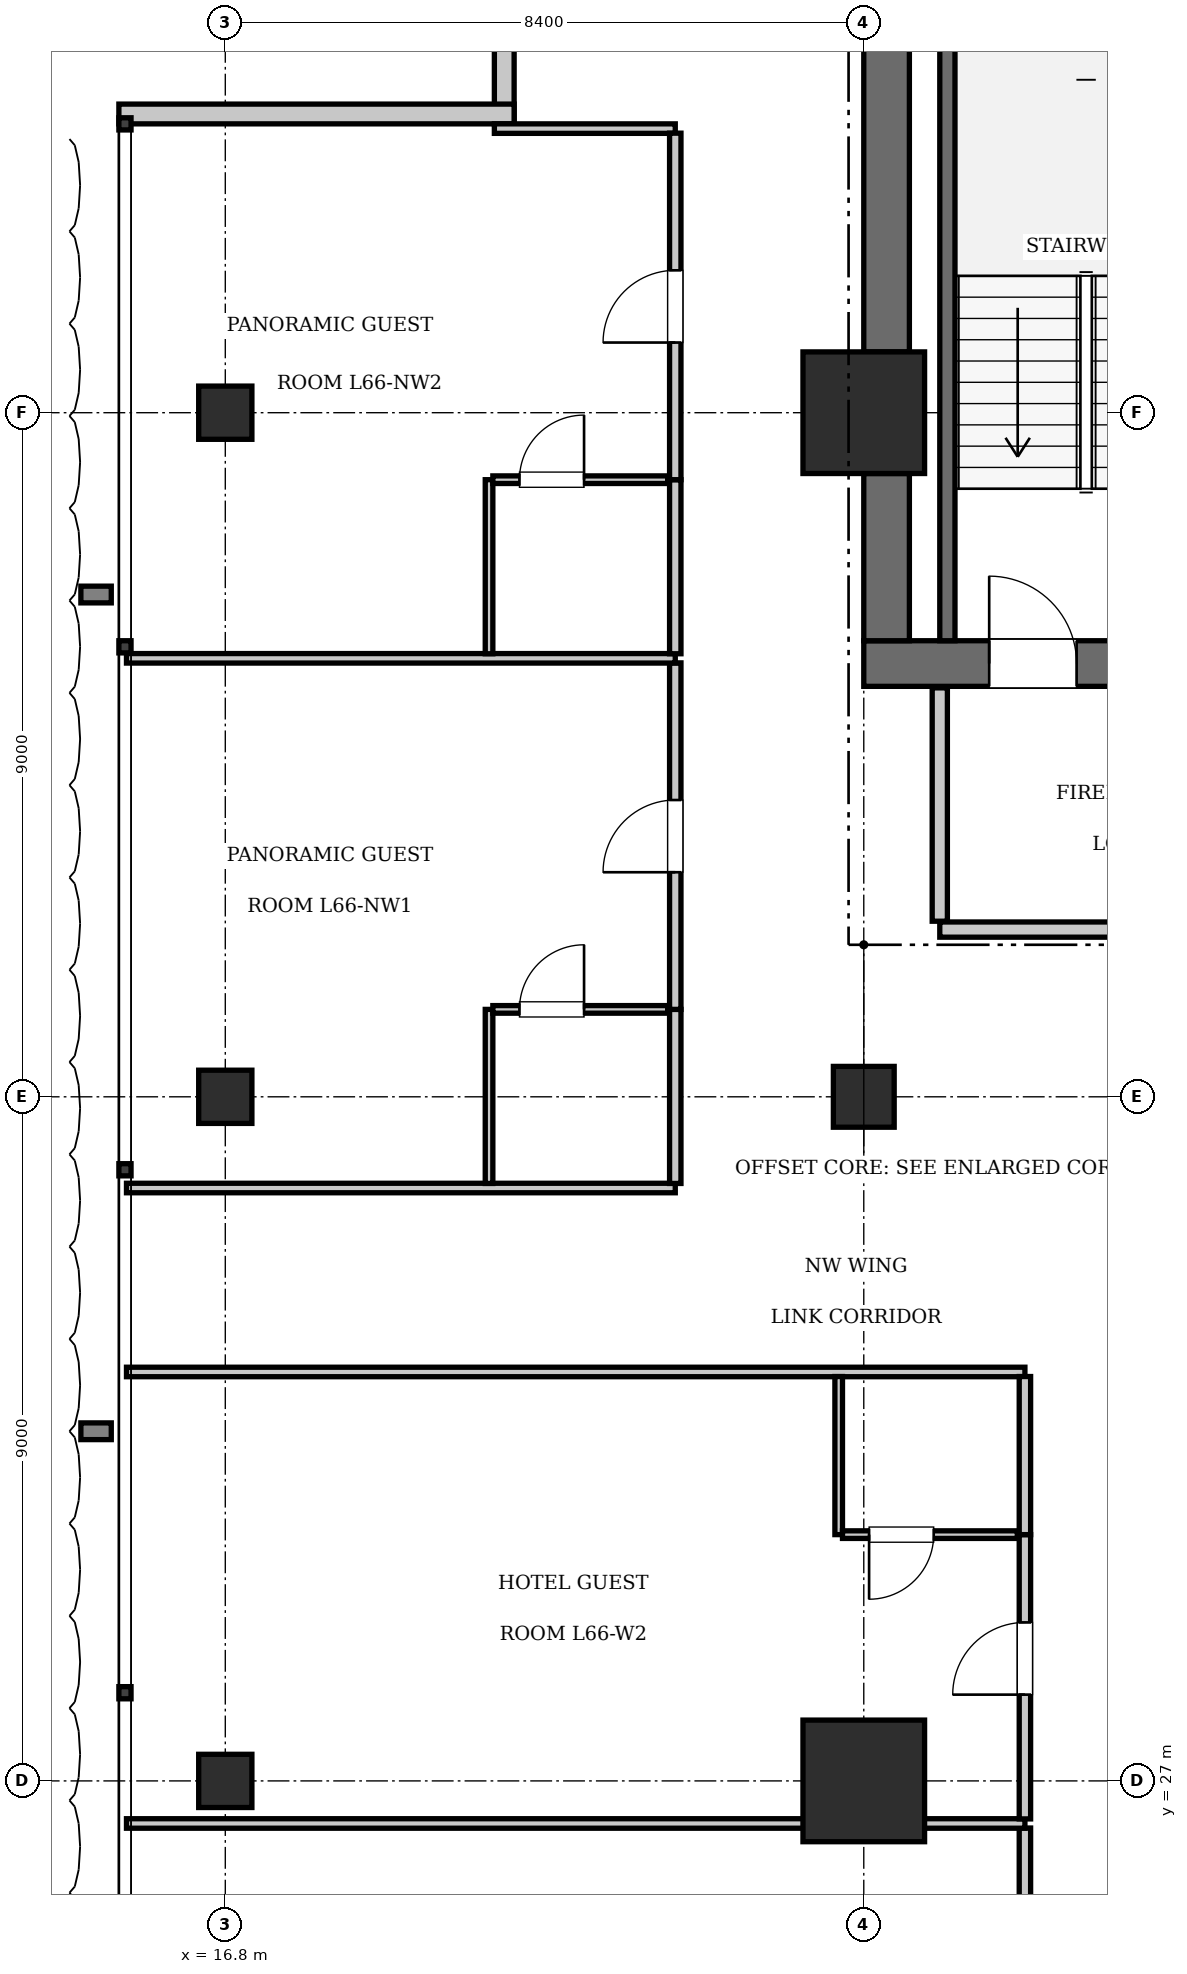
"""IFC4 building model, lengths in metres.
Left out: names, types, materials, properties, quantities, classifications, styles, units other than length and angle.
Written with IfcOpenShell. Run it as: python <this file> out.ifc"""

import sys

from ifc_helpers import new_model, si_unit, direction, frame, frame_2d, origin, origin_2d, place, context, subcontext, project, spatial, rectangle, extrude, element, fill, save


model = new_model("IFC4")
c1 = context("Model", 3, precision=1e-05, world=origin(), true_north=direction((0.0, 1.0)))
c2 = subcontext(c1, "Body", "Model", "MODEL_VIEW")
j1 = project(units=[si_unit("LENGTHUNIT", "METRE"), si_unit("PLANEANGLEUNIT", "RADIAN")], contexts=[c1])
p1 = place(None, origin())
s1 = spatial("IfcSite", under=j1, at=p1, CompositionType="ELEMENT")
p2 = place(p1, origin())
s2 = spatial("IfcBuilding", under=s1, at=p2, CompositionType="ELEMENT")
p3 = place(p2, frame((0.0, 0.0, 270.2)))
s3 = spatial("IfcBuildingStorey", under=s2, at=p3, CompositionType="ELEMENT", Elevation=270.2)
for number, where, z_axis, x_axis in (
    (1, (25.2, 27.0, 0.0), (0.0, 0.0, 1.0), (1.0, 0.0, 0.0)),
    (2, (25.2, 45.0, 0.0), (0.0, 0.0, 1.0), (1.0, 0.0, 0.0)),
):
    element("IfcColumn", number, at=place(p3, frame(where, z_axis=z_axis, x_axis=x_axis)), inside=s3, PredefinedType="COLUMN", context=c2, shape_type="SweptSolid", body=[
        extrude(rectangle(XDim=1.6, YDim=1.6, at=origin_2d()), origin(), (0.0, 0.0, 1.0), 3.85),
    ])
p4 = place(p3, frame((25.2, 41.7, 0.0), z_axis=(0.0, 0.0, 1.0), x_axis=(1.0, 0.0, 0.0)))
e3 = element("IfcWall", 3, at=p4, inside=s3, PredefinedType="SHEAR", context=c2, shape_type="SweptSolid", body=[
    extrude(rectangle(XDim=6.8, YDim=0.6, at=frame_2d((3.4, 0.0))), origin(), (0.0, 0.0, 1.0), 3.85),
])
p5 = place(p4, frame((1.65, 0.0, 0.0)))
e4 = element("IfcOpeningElement", 4, at=p5, cuts=e3, PredefinedType="OPENING", context=c2, shape_type="SweptSolid", body=[
    extrude(rectangle(XDim=1.15, YDim=2.15, at=frame_2d((0.575, 1.075))), frame((0.0, 0.31, 0.0), z_axis=(0.0, -1.0, 0.0), x_axis=(1.0, 0.0, 0.0)), (0.0, 0.0, 1.0), 0.62),
])
p6 = place(p4, frame((5.15, 0.0, 0.0)))
e5 = element("IfcOpeningElement", 5, at=p6, cuts=e3, PredefinedType="OPENING", context=c2, shape_type="SweptSolid", body=[
    extrude(rectangle(XDim=1.1, YDim=2.2, at=frame_2d((0.55, 1.1))), frame((0.0, 0.31, 0.0), z_axis=(0.0, -1.0, 0.0), x_axis=(1.0, 0.0, 0.0)), (0.0, 0.0, 1.0), 0.62),
])
p7 = place(p3, frame((25.5, 42.0, 0.0), z_axis=(0.0, 0.0, 1.0), x_axis=(0.0, 1.0, 0.0)))
e6 = element("IfcWall", 6, at=p7, inside=s3, PredefinedType="SHEAR", context=c2, shape_type="SweptSolid", body=[
    extrude(rectangle(XDim=2.2, YDim=0.6, at=frame_2d((1.1, 0.0))), origin(), (0.0, 0.0, 1.0), 3.85),
])
p8 = place(p3, frame((25.5, 45.8, 0.0), z_axis=(0.0, 0.0, 1.0), x_axis=(0.0, 1.0, 0.0)))
e7 = element("IfcWall", 7, at=p8, inside=s3, PredefinedType="SHEAR", context=c2, shape_type="SweptSolid", body=[
    extrude(rectangle(XDim=7.6, YDim=0.6, at=frame_2d((3.8, 0.0))), origin(), (0.0, 0.0, 1.0), 3.85),
])
p9 = place(p3, frame((25.2, 36.0, 0.0), z_axis=(0.0, 0.0, 1.0), x_axis=(1.0, 0.0, 0.0)))
e8 = element("IfcColumn", 8, at=p9, inside=s3, PredefinedType="COLUMN", context=c2, shape_type="SweptSolid", body=[
    extrude(rectangle(XDim=0.8, YDim=0.8, at=origin_2d()), origin(), (0.0, 0.0, 1.0), 3.85),
])
for number, where, z_axis, x_axis in (
    (9, (16.8, 27.0, 0.0), (0.0, 0.0, 1.0), (1.0, 0.0, 0.0)),
    (10, (16.8, 36.0, 0.0), (0.0, 0.0, 1.0), (1.0, 0.0, 0.0)),
    (11, (16.8, 45.0, 0.0), (0.0, 0.0, 1.0), (1.0, 0.0, 0.0)),
):
    element("IfcColumn", number, at=place(p3, frame(where, z_axis=z_axis, x_axis=x_axis)), inside=s3, PredefinedType="COLUMN", context=c2, shape_type="SweptSolid", body=[
        extrude(rectangle(XDim=0.7, YDim=0.7, at=origin_2d()), origin(), (0.0, 0.0, 1.0), 3.85),
    ])
p10 = place(p3, frame((26.3, 42.0, 0.0), z_axis=(0.0, 0.0, 1.0), x_axis=(0.0, 1.0, 0.0)))
e12 = element("IfcWall", 12, at=p10, inside=s3, PredefinedType="SOLIDWALL", context=c2, shape_type="SweptSolid", body=[
    extrude(rectangle(XDim=9.12, YDim=0.2, at=frame_2d((4.56, 0.0))), origin(), (0.0, 0.0, 1.0), 3.61),
])
p11 = place(p3, frame((20.47, 48.8, 0.0), z_axis=(0.0, 0.0, 1.0), x_axis=(0.0, 1.0, 0.0)))
e13 = element("IfcWall", 13, at=p11, inside=s3, PredefinedType="SOLIDWALL", context=c2, shape_type="SweptSolid", body=[
    extrude(rectangle(XDim=5.2, YDim=0.26, at=frame_2d((2.6, 0.0))), origin(), (0.0, 0.0, 1.0), 3.61),
])
p12 = place(p3, frame((15.4, 48.93, 0.0), z_axis=(0.0, 0.0, 1.0), x_axis=(1.0, 0.0, 0.0)))
e14 = element("IfcWall", 14, at=p12, inside=s3, PredefinedType="SOLIDWALL", context=c2, shape_type="SweptSolid", body=[
    extrude(rectangle(XDim=5.2, YDim=0.26, at=frame_2d((2.6, 0.0))), origin(), (0.0, 0.0, 1.0), 3.61),
])
p13 = place(p3, frame((26.2, 38.2, 0.0), z_axis=(0.0, 0.0, 1.0), x_axis=(1.0, 0.0, 0.0)))
e15 = element("IfcWall", 15, at=p13, inside=s3, PredefinedType="PARTITIONING", context=c2, shape_type="SweptSolid", body=[
    extrude(rectangle(XDim=5.8, YDim=0.2, at=frame_2d((2.9, 0.0))), origin(), (0.0, 0.0, 1.0), 3.61),
])
p14 = place(p13, frame((2.3, 0.0, 0.0)))
e16 = element("IfcOpeningElement", 16, at=p14, cuts=e15, PredefinedType="OPENING", context=c2, shape_type="SweptSolid", body=[
    extrude(rectangle(XDim=1.15, YDim=2.15, at=frame_2d((0.575, 1.075))), frame((0.0, 0.11, 0.0), z_axis=(0.0, -1.0, 0.0), x_axis=(1.0, 0.0, 0.0)), (0.0, 0.0, 1.0), 0.22),
])
p15 = place(p3, frame((26.2, 38.31, 0.0), z_axis=(0.0, 0.0, 1.0), x_axis=(0.0, 1.0, 0.0)))
e17 = element("IfcWall", 17, at=p15, inside=s3, PredefinedType="PARTITIONING", context=c2, shape_type="SweptSolid", body=[
    extrude(rectangle(XDim=3.07, YDim=0.2, at=frame_2d((1.535, 0.0))), origin(), (0.0, 0.0, 1.0), 3.61),
])
p16 = place(p3, frame((15.5, 32.38, 0.0), z_axis=(0.0, 0.0, 1.0), x_axis=(1.0, 0.0, 0.0)))
e18 = element("IfcWall", 18, at=p16, inside=s3, PredefinedType="PARTITIONING", context=c2, shape_type="SweptSolid", body=[
    extrude(rectangle(XDim=11.82, YDim=0.125, at=frame_2d((5.91, 0.0))), origin(), (0.0, 0.0, 1.0), 3.61),
])
p17 = place(p3, frame((27.32, 22.64, 0.0), z_axis=(0.0, 0.0, 1.0), x_axis=(0.0, 1.0, 0.0)))
e19 = element("IfcWall", 19, at=p17, inside=s3, PredefinedType="PARTITIONING", context=c2, shape_type="SweptSolid", body=[
    extrude(rectangle(XDim=3.74, YDim=0.15, at=frame_2d((1.87, 0.0))), origin(), (0.0, 0.0, 1.0), 3.61),
])
p18 = place(p17, frame((1.395, 0.0, 0.0)))
e20 = element("IfcOpeningElement", 20, at=p18, cuts=e19, PredefinedType="OPENING", context=c2, shape_type="SweptSolid", body=[
    extrude(rectangle(XDim=0.95, YDim=2.15, at=frame_2d((0.475, 1.075))), frame((0.0, 0.085, 0.0), z_axis=(0.0, -1.0, 0.0), x_axis=(1.0, 0.0, 0.0)), (0.0, 0.0, 1.0), 0.17),
])
p19 = place(p3, frame((15.5, 26.44, 0.0), z_axis=(0.0, 0.0, 1.0), x_axis=(1.0, 0.0, 0.0)))
e21 = element("IfcWall", 21, at=p19, inside=s3, PredefinedType="PARTITIONING", context=c2, shape_type="SweptSolid", body=[
    extrude(rectangle(XDim=11.82, YDim=0.125, at=frame_2d((5.91, 0.0))), origin(), (0.0, 0.0, 1.0), 3.61),
])
p20 = place(p3, frame((27.32, 26.5, 0.0), z_axis=(0.0, 0.0, 1.0), x_axis=(0.0, 1.0, 0.0)))
e22 = element("IfcWall", 22, at=p20, inside=s3, PredefinedType="PARTITIONING", context=c2, shape_type="SweptSolid", body=[
    extrude(rectangle(XDim=3.74, YDim=0.15, at=frame_2d((1.87, 0.0))), origin(), (0.0, 0.0, 1.0), 3.61),
])
p21 = place(p20, frame((1.635, 0.0, 0.0)))
e23 = element("IfcOpeningElement", 23, at=p21, cuts=e22, PredefinedType="OPENING", context=c2, shape_type="SweptSolid", body=[
    extrude(rectangle(XDim=0.95, YDim=2.15, at=frame_2d((0.475, 1.075))), frame((0.0, 0.085, 0.0), z_axis=(0.0, -1.0, 0.0), x_axis=(1.0, 0.0, 0.0)), (0.0, 0.0, 1.0), 0.17),
])
p22 = place(p3, frame((27.32, 30.24, 0.0), z_axis=(0.0, 0.0, 1.0), x_axis=(0.0, 1.0, 0.0)))
e24 = element("IfcWall", 24, at=p22, inside=s3, PredefinedType="PARTITIONING", context=c2, shape_type="SweptSolid", body=[
    extrude(rectangle(XDim=2.08, YDim=0.15, at=frame_2d((1.04, 0.0))), origin(), (0.0, 0.0, 1.0), 3.61),
])
p23 = place(p3, frame((24.87, 30.24, 0.0), z_axis=(0.0, 0.0, 1.0), x_axis=(0.0, 1.0, 0.0)))
e25 = element("IfcWall", 25, at=p23, inside=s3, PredefinedType="PARTITIONING", context=c2, shape_type="SweptSolid", body=[
    extrude(rectangle(XDim=2.08, YDim=0.1, at=frame_2d((1.04, 0.0))), origin(), (0.0, 0.0, 1.0), 3.61),
])
p24 = place(p3, frame((24.92, 30.24, 0.0), z_axis=(0.0, 0.0, 1.0), x_axis=(1.0, 0.0, 0.0)))
e26 = element("IfcWall", 26, at=p24, inside=s3, PredefinedType="PARTITIONING", context=c2, shape_type="SweptSolid", body=[
    extrude(rectangle(XDim=2.3, YDim=0.1, at=frame_2d((1.15, 0.0))), origin(), (0.0, 0.0, 1.0), 3.61),
])
p25 = place(p24, frame((0.35, 0.0, 0.0)))
e27 = element("IfcOpeningElement", 27, at=p25, cuts=e26, PredefinedType="OPENING", context=c2, shape_type="SweptSolid", body=[
    extrude(rectangle(XDim=0.85, YDim=2.1, at=frame_2d((0.425, 1.05))), frame((0.0, 0.06, 0.0), z_axis=(0.0, -1.0, 0.0), x_axis=(1.0, 0.0, 0.0)), (0.0, 0.0, 1.0), 0.12),
])
p26 = place(p3, frame((15.5, 34.8, 0.0), z_axis=(0.0, 0.0, 1.0), x_axis=(1.0, 0.0, 0.0)))
e28 = element("IfcWall", 28, at=p26, inside=s3, PredefinedType="PARTITIONING", context=c2, shape_type="SweptSolid", body=[
    extrude(rectangle(XDim=7.22, YDim=0.125, at=frame_2d((3.61, 0.0))), origin(), (0.0, 0.0, 1.0), 3.61),
])
p27 = place(p3, frame((20.34, 48.738, 0.0), z_axis=(0.0, 0.0, 1.0), x_axis=(1.0, 0.0, 0.0)))
e29 = element("IfcWall", 29, at=p27, inside=s3, PredefinedType="PARTITIONING", context=c2, shape_type="SweptSolid", body=[
    extrude(rectangle(XDim=2.38, YDim=0.125, at=frame_2d((1.19, 0.0))), origin(), (0.0, 0.0, 1.0), 3.61),
])
p28 = place(p3, frame((22.72, 34.86, 0.0), z_axis=(0.0, 0.0, 1.0), x_axis=(0.0, 1.0, 0.0)))
e30 = element("IfcWall", 30, at=p28, inside=s3, PredefinedType="PARTITIONING", context=c2, shape_type="SweptSolid", body=[
    extrude(rectangle(XDim=2.29, YDim=0.15, at=frame_2d((1.145, 0.0))), origin(), (0.0, 0.0, 1.0), 3.61),
])
p29 = place(p3, frame((22.72, 37.15, 0.0), z_axis=(0.0, 0.0, 1.0), x_axis=(0.0, 1.0, 0.0)))
e31 = element("IfcWall", 31, at=p29, inside=s3, PredefinedType="PARTITIONING", context=c2, shape_type="SweptSolid", body=[
    extrude(rectangle(XDim=4.559, YDim=0.15, at=frame_2d((2.279, 0.0))), origin(), (0.0, 0.0, 1.0), 3.61),
])
p30 = place(p29, frame((1.804, 0.0, 0.0)))
e32 = element("IfcOpeningElement", 32, at=p30, cuts=e31, PredefinedType="OPENING", context=c2, shape_type="SweptSolid", body=[
    extrude(rectangle(XDim=0.95, YDim=2.15, at=frame_2d((0.475, 1.075))), frame((0.0, 0.085, 0.0), z_axis=(0.0, -1.0, 0.0), x_axis=(1.0, 0.0, 0.0)), (0.0, 0.0, 1.0), 0.17),
])
p31 = place(p3, frame((20.27, 34.86, 0.0), z_axis=(0.0, 0.0, 1.0), x_axis=(0.0, 1.0, 0.0)))
e33 = element("IfcWall", 33, at=p31, inside=s3, PredefinedType="PARTITIONING", context=c2, shape_type="SweptSolid", body=[
    extrude(rectangle(XDim=2.29, YDim=0.1, at=frame_2d((1.145, 0.0))), origin(), (0.0, 0.0, 1.0), 3.61),
])
p32 = place(p3, frame((20.32, 37.15, 0.0), z_axis=(0.0, 0.0, 1.0), x_axis=(1.0, 0.0, 0.0)))
e34 = element("IfcWall", 34, at=p32, inside=s3, PredefinedType="PARTITIONING", context=c2, shape_type="SweptSolid", body=[
    extrude(rectangle(XDim=2.3, YDim=0.1, at=frame_2d((1.15, 0.0))), origin(), (0.0, 0.0, 1.0), 3.61),
])
p33 = place(p32, frame((0.35, 0.0, 0.0)))
e35 = element("IfcOpeningElement", 35, at=p33, cuts=e34, PredefinedType="OPENING", context=c2, shape_type="SweptSolid", body=[
    extrude(rectangle(XDim=0.85, YDim=2.1, at=frame_2d((0.425, 1.05))), frame((0.0, 0.06, 0.0), z_axis=(0.0, -1.0, 0.0), x_axis=(1.0, 0.0, 0.0)), (0.0, 0.0, 1.0), 0.12),
])
p34 = place(p3, frame((15.5, 41.769, 0.0), z_axis=(0.0, 0.0, 1.0), x_axis=(1.0, 0.0, 0.0)))
e36 = element("IfcWall", 36, at=p34, inside=s3, PredefinedType="PARTITIONING", context=c2, shape_type="SweptSolid", body=[
    extrude(rectangle(XDim=7.22, YDim=0.125, at=frame_2d((3.61, 0.0))), origin(), (0.0, 0.0, 1.0), 3.61),
])
p35 = place(p3, frame((22.72, 41.829, 0.0), z_axis=(0.0, 0.0, 1.0), x_axis=(0.0, 1.0, 0.0)))
e37 = element("IfcWall", 37, at=p35, inside=s3, PredefinedType="PARTITIONING", context=c2, shape_type="SweptSolid", body=[
    extrude(rectangle(XDim=2.29, YDim=0.15, at=frame_2d((1.145, 0.0))), origin(), (0.0, 0.0, 1.0), 3.61),
])
p36 = place(p3, frame((22.72, 44.119, 0.0), z_axis=(0.0, 0.0, 1.0), x_axis=(0.0, 1.0, 0.0)))
e38 = element("IfcWall", 38, at=p36, inside=s3, PredefinedType="PARTITIONING", context=c2, shape_type="SweptSolid", body=[
    extrude(rectangle(XDim=4.559, YDim=0.15, at=frame_2d((2.279, 0.0))), origin(), (0.0, 0.0, 1.0), 3.61),
])
p37 = place(p36, frame((1.804, 0.0, 0.0)))
e39 = element("IfcOpeningElement", 39, at=p37, cuts=e38, PredefinedType="OPENING", context=c2, shape_type="SweptSolid", body=[
    extrude(rectangle(XDim=0.95, YDim=2.15, at=frame_2d((0.475, 1.075))), frame((0.0, 0.085, 0.0), z_axis=(0.0, -1.0, 0.0), x_axis=(1.0, 0.0, 0.0)), (0.0, 0.0, 1.0), 0.17),
])
p38 = place(p3, frame((20.27, 41.829, 0.0), z_axis=(0.0, 0.0, 1.0), x_axis=(0.0, 1.0, 0.0)))
e40 = element("IfcWall", 40, at=p38, inside=s3, PredefinedType="PARTITIONING", context=c2, shape_type="SweptSolid", body=[
    extrude(rectangle(XDim=2.29, YDim=0.1, at=frame_2d((1.145, 0.0))), origin(), (0.0, 0.0, 1.0), 3.61),
])
p39 = place(p3, frame((20.32, 44.119, 0.0), z_axis=(0.0, 0.0, 1.0), x_axis=(1.0, 0.0, 0.0)))
e41 = element("IfcWall", 41, at=p39, inside=s3, PredefinedType="PARTITIONING", context=c2, shape_type="SweptSolid", body=[
    extrude(rectangle(XDim=2.3, YDim=0.1, at=frame_2d((1.15, 0.0))), origin(), (0.0, 0.0, 1.0), 3.61),
])
p40 = place(p39, frame((0.35, 0.0, 0.0)))
e42 = element("IfcOpeningElement", 42, at=p40, cuts=e41, PredefinedType="OPENING", context=c2, shape_type="SweptSolid", body=[
    extrude(rectangle(XDim=0.85, YDim=2.1, at=frame_2d((0.425, 1.05))), frame((0.0, 0.06, 0.0), z_axis=(0.0, -1.0, 0.0), x_axis=(1.0, 0.0, 0.0)), (0.0, 0.0, 1.0), 0.12),
])
p41 = place(p5, origin())
e43 = element("IfcDoor", 43, at=p41, inside=s3, OperationType="SINGLE_SWING_LEFT", PredefinedType="DOOR", context=c2, shape_type="SweptSolid", body=[
    extrude(rectangle(XDim=1.15, YDim=2.15, at=frame_2d((0.575, 1.075))), frame((0.0, 0.025, 0.0), z_axis=(0.0, -1.0, 0.0), x_axis=(1.0, 0.0, 0.0)), (0.0, 0.0, 1.0), 0.05),
])
fill(e4, e43)
p42 = place(p25, frame((0.85, 0.0, 0.0), z_axis=(0.0, 0.0, 1.0), x_axis=(-1.0, 0.0, 0.0)))
e44 = element("IfcDoor", 44, at=p42, inside=s3, OperationType="SINGLE_SWING_RIGHT", PredefinedType="DOOR", context=c2, shape_type="SweptSolid", body=[
    extrude(rectangle(XDim=0.85, YDim=2.1, at=frame_2d((0.425, 1.05))), frame((0.0, 0.025, 0.0), z_axis=(0.0, -1.0, 0.0), x_axis=(1.0, 0.0, 0.0)), (0.0, 0.0, 1.0), 0.05),
])
fill(e27, e44)
p43 = place(p21, origin())
e45 = element("IfcDoor", 45, at=p43, inside=s3, OperationType="SINGLE_SWING_LEFT", PredefinedType="DOOR", context=c2, shape_type="SweptSolid", body=[
    extrude(rectangle(XDim=0.95, YDim=2.15, at=frame_2d((0.475, 1.075))), frame((0.0, 0.025, 0.0), z_axis=(0.0, -1.0, 0.0), x_axis=(1.0, 0.0, 0.0)), (0.0, 0.0, 1.0), 0.05),
])
fill(e23, e45)
p44 = place(p33, origin())
e46 = element("IfcDoor", 46, at=p44, inside=s3, OperationType="SINGLE_SWING_RIGHT", PredefinedType="DOOR", context=c2, shape_type="SweptSolid", body=[
    extrude(rectangle(XDim=0.85, YDim=2.1, at=frame_2d((0.425, 1.05))), frame((0.0, 0.025, 0.0), z_axis=(0.0, -1.0, 0.0), x_axis=(1.0, 0.0, 0.0)), (0.0, 0.0, 1.0), 0.05),
])
fill(e35, e46)
p45 = place(p30, origin())
e47 = element("IfcDoor", 47, at=p45, inside=s3, OperationType="SINGLE_SWING_LEFT", PredefinedType="DOOR", context=c2, shape_type="SweptSolid", body=[
    extrude(rectangle(XDim=0.95, YDim=2.15, at=frame_2d((0.475, 1.075))), frame((0.0, 0.025, 0.0), z_axis=(0.0, -1.0, 0.0), x_axis=(1.0, 0.0, 0.0)), (0.0, 0.0, 1.0), 0.05),
])
fill(e32, e47)
p46 = place(p40, origin())
e48 = element("IfcDoor", 48, at=p46, inside=s3, OperationType="SINGLE_SWING_RIGHT", PredefinedType="DOOR", context=c2, shape_type="SweptSolid", body=[
    extrude(rectangle(XDim=0.85, YDim=2.1, at=frame_2d((0.425, 1.05))), frame((0.0, 0.025, 0.0), z_axis=(0.0, -1.0, 0.0), x_axis=(1.0, 0.0, 0.0)), (0.0, 0.0, 1.0), 0.05),
])
fill(e42, e48)
p47 = place(p37, origin())
e49 = element("IfcDoor", 49, at=p47, inside=s3, OperationType="SINGLE_SWING_LEFT", PredefinedType="DOOR", context=c2, shape_type="SweptSolid", body=[
    extrude(rectangle(XDim=0.95, YDim=2.15, at=frame_2d((0.475, 1.075))), frame((0.0, 0.025, 0.0), z_axis=(0.0, -1.0, 0.0), x_axis=(1.0, 0.0, 0.0)), (0.0, 0.0, 1.0), 0.05),
])
fill(e39, e49)
save(model, sys.argv[1])
